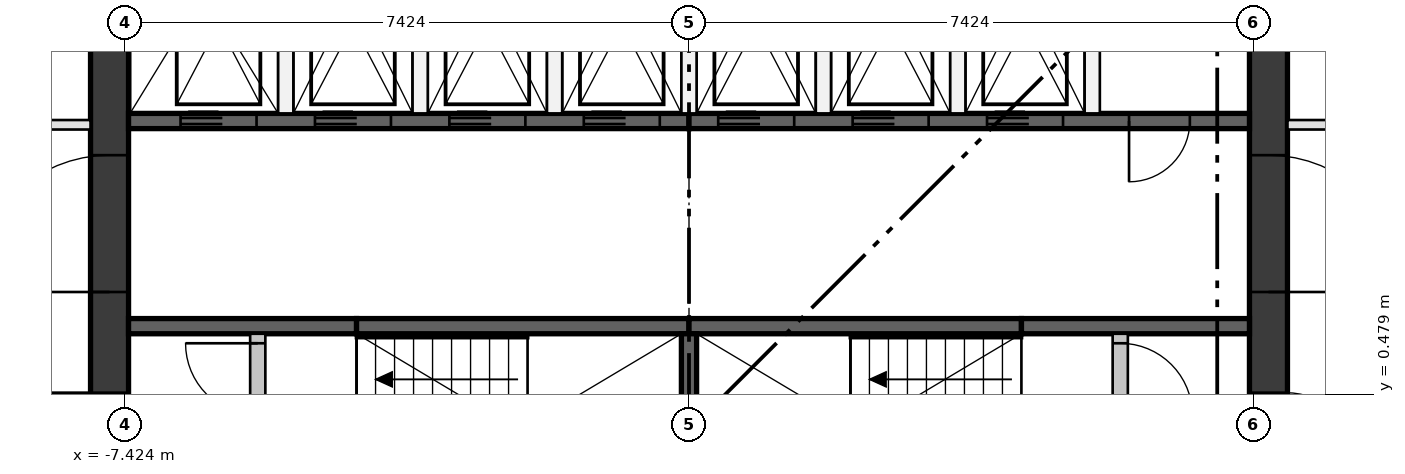
"""IFC4 building model, lengths in metres.
Left out: names, types, materials, properties, quantities, classifications, styles, units other than length and angle.
Written with IfcOpenShell. Run it as: python <this file> out.ifc"""

import sys

from ifc_helpers import new_model, si_unit, direction, frame, frame_2d, origin, place, context, subcontext, project, spatial, rectangle, extrude, element, fill, save


model = new_model("IFC4")
c1 = context("Model", 3, precision=1e-05, world=origin(), true_north=direction((0.0, 1.0)))
c2 = subcontext(c1, "Body", "Model", "MODEL_VIEW")
j1 = project(units=[si_unit("LENGTHUNIT", "METRE"), si_unit("PLANEANGLEUNIT", "RADIAN")], contexts=[c1])
p1 = place(None, origin())
s1 = spatial("IfcSite", under=j1, at=p1, CompositionType="ELEMENT")
p2 = place(p1, origin())
s2 = spatial("IfcBuilding", under=s1, at=p2, CompositionType="ELEMENT")
p3 = place(p2, frame((0.0, 0.0, 180.95)))
s3 = spatial("IfcBuildingStorey", under=s2, at=p3, CompositionType="ELEMENT", Elevation=180.95)
p4 = place(p3, frame((-7.624, -7.374, 0.0), z_axis=(0.0, 0.0, 1.0), x_axis=(0.0, 1.0, 0.0)))
e1 = element("IfcWall", 1, at=p4, inside=s3, PredefinedType="SHEAR", context=c2, shape_type="SweptSolid", body=[
    extrude(rectangle(XDim=14.748, YDim=0.5, at=frame_2d((7.374, 0.0))), origin(), (0.0, 0.0, 1.0), 3.35),
])
p5 = place(p4, frame((6.874, 0.0, 0.0)))
e2 = element("IfcOpeningElement", 2, at=p5, cuts=e1, PredefinedType="OPENING", context=c2, shape_type="SweptSolid", body=[
    extrude(rectangle(XDim=1.0, YDim=2.1, at=frame_2d((0.5, 1.05))), frame((0.0, 0.26, 0.0), z_axis=(0.0, -1.0, 0.0), x_axis=(1.0, 0.0, 0.0)), (0.0, 0.0, 1.0), 0.52),
])
p6 = place(p4, frame((3.75, 0.0, 0.0)))
e3 = element("IfcOpeningElement", 3, at=p6, cuts=e1, PredefinedType="OPENING", context=c2, shape_type="SweptSolid", body=[
    extrude(rectangle(XDim=1.8, YDim=2.1, at=frame_2d((0.9, 1.05))), frame((0.0, 0.26, 0.0), z_axis=(0.0, -1.0, 0.0), x_axis=(1.0, 0.0, 0.0)), (0.0, 0.0, 1.0), 0.52),
])
p7 = place(p4, frame((9.198, 0.0, 0.0)))
e4 = element("IfcOpeningElement", 4, at=p7, cuts=e1, PredefinedType="OPENING", context=c2, shape_type="SweptSolid", body=[
    extrude(rectangle(XDim=1.8, YDim=2.1, at=frame_2d((0.9, 1.05))), frame((0.0, 0.26, 0.0), z_axis=(0.0, -1.0, 0.0), x_axis=(1.0, 0.0, 0.0)), (0.0, 0.0, 1.0), 0.52),
])
p8 = place(p3, frame((7.624, -7.374, 0.0), z_axis=(0.0, 0.0, 1.0), x_axis=(0.0, 1.0, 0.0)))
e5 = element("IfcWall", 5, at=p8, inside=s3, PredefinedType="SHEAR", context=c2, shape_type="SweptSolid", body=[
    extrude(rectangle(XDim=14.748, YDim=0.5, at=frame_2d((7.374, 0.0))), origin(), (0.0, 0.0, 1.0), 3.35),
])
p9 = place(p8, frame((6.874, 0.0, 0.0)))
e6 = element("IfcOpeningElement", 6, at=p9, cuts=e5, PredefinedType="OPENING", context=c2, shape_type="SweptSolid", body=[
    extrude(rectangle(XDim=1.0, YDim=2.1, at=frame_2d((0.5, 1.05))), frame((0.0, 0.26, 0.0), z_axis=(0.0, -1.0, 0.0), x_axis=(1.0, 0.0, 0.0)), (0.0, 0.0, 1.0), 0.52),
])
p10 = place(p8, frame((3.75, 0.0, 0.0)))
e7 = element("IfcOpeningElement", 7, at=p10, cuts=e5, PredefinedType="OPENING", context=c2, shape_type="SweptSolid", body=[
    extrude(rectangle(XDim=1.8, YDim=2.1, at=frame_2d((0.9, 1.05))), frame((0.0, 0.26, 0.0), z_axis=(0.0, -1.0, 0.0), x_axis=(1.0, 0.0, 0.0)), (0.0, 0.0, 1.0), 0.52),
])
p11 = place(p8, frame((9.198, 0.0, 0.0)))
e8 = element("IfcOpeningElement", 8, at=p11, cuts=e5, PredefinedType="OPENING", context=c2, shape_type="SweptSolid", body=[
    extrude(rectangle(XDim=1.8, YDim=2.1, at=frame_2d((0.9, 1.05))), frame((0.0, 0.26, 0.0), z_axis=(0.0, -1.0, 0.0), x_axis=(1.0, 0.0, 0.0)), (0.0, 0.0, 1.0), 0.52),
])
p12 = place(p3, frame((-7.374, 4.074, 0.0), z_axis=(0.0, 0.0, 1.0), x_axis=(1.0, 0.0, 0.0)))
e9 = element("IfcWall", 9, at=p12, inside=s3, PredefinedType="SHEAR", context=c2, shape_type="SweptSolid", body=[
    extrude(rectangle(XDim=7.374, YDim=0.2, at=frame_2d((3.687, 0.0))), origin(), (0.0, 0.0, 1.0), 3.0),
])
p13 = place(p12, frame((0.684, 0.0, 0.0)))
e10 = element("IfcOpeningElement", 10, at=p13, cuts=e9, PredefinedType="OPENING", context=c2, shape_type="SweptSolid", body=[
    extrude(rectangle(XDim=1.0, YDim=2.1, at=frame_2d((0.5, 1.05))), frame((0.0, 0.11, 0.0), z_axis=(0.0, -1.0, 0.0), x_axis=(1.0, 0.0, 0.0)), (0.0, 0.0, 1.0), 0.22),
])
p14 = place(p12, frame((2.453, 0.0, 0.0)))
e11 = element("IfcOpeningElement", 11, at=p14, cuts=e9, PredefinedType="OPENING", context=c2, shape_type="SweptSolid", body=[
    extrude(rectangle(XDim=1.0, YDim=2.1, at=frame_2d((0.5, 1.05))), frame((0.0, 0.11, 0.0), z_axis=(0.0, -1.0, 0.0), x_axis=(1.0, 0.0, 0.0)), (0.0, 0.0, 1.0), 0.22),
])
p15 = place(p12, frame((4.221, 0.0, 0.0)))
e12 = element("IfcOpeningElement", 12, at=p15, cuts=e9, PredefinedType="OPENING", context=c2, shape_type="SweptSolid", body=[
    extrude(rectangle(XDim=1.0, YDim=2.1, at=frame_2d((0.5, 1.05))), frame((0.0, 0.11, 0.0), z_axis=(0.0, -1.0, 0.0), x_axis=(1.0, 0.0, 0.0)), (0.0, 0.0, 1.0), 0.22),
])
p16 = place(p12, frame((5.99, 0.0, 0.0)))
e13 = element("IfcOpeningElement", 13, at=p16, cuts=e9, PredefinedType="OPENING", context=c2, shape_type="SweptSolid", body=[
    extrude(rectangle(XDim=1.0, YDim=2.1, at=frame_2d((0.5, 1.05))), frame((0.0, 0.11, 0.0), z_axis=(0.0, -1.0, 0.0), x_axis=(1.0, 0.0, 0.0)), (0.0, 0.0, 1.0), 0.22),
])
p17 = place(p3, frame((0.0, 4.074, 0.0), z_axis=(0.0, 0.0, 1.0), x_axis=(1.0, 0.0, 0.0)))
e14 = element("IfcWall", 14, at=p17, inside=s3, PredefinedType="SHEAR", context=c2, shape_type="SweptSolid", body=[
    extrude(rectangle(XDim=7.374, YDim=0.2, at=frame_2d((3.687, 0.0))), origin(), (0.0, 0.0, 1.0), 3.0),
])
p18 = place(p17, frame((0.384, 0.0, 0.0)))
e15 = element("IfcOpeningElement", 15, at=p18, cuts=e14, PredefinedType="OPENING", context=c2, shape_type="SweptSolid", body=[
    extrude(rectangle(XDim=1.0, YDim=2.1, at=frame_2d((0.5, 1.05))), frame((0.0, 0.11, 0.0), z_axis=(0.0, -1.0, 0.0), x_axis=(1.0, 0.0, 0.0)), (0.0, 0.0, 1.0), 0.22),
])
p19 = place(p17, frame((2.153, 0.0, 0.0)))
e16 = element("IfcOpeningElement", 16, at=p19, cuts=e14, PredefinedType="OPENING", context=c2, shape_type="SweptSolid", body=[
    extrude(rectangle(XDim=1.0, YDim=2.1, at=frame_2d((0.5, 1.05))), frame((0.0, 0.11, 0.0), z_axis=(0.0, -1.0, 0.0), x_axis=(1.0, 0.0, 0.0)), (0.0, 0.0, 1.0), 0.22),
])
p20 = place(p17, frame((3.921, 0.0, 0.0)))
e17 = element("IfcOpeningElement", 17, at=p20, cuts=e14, PredefinedType="OPENING", context=c2, shape_type="SweptSolid", body=[
    extrude(rectangle(XDim=1.0, YDim=2.1, at=frame_2d((0.5, 1.05))), frame((0.0, 0.11, 0.0), z_axis=(0.0, -1.0, 0.0), x_axis=(1.0, 0.0, 0.0)), (0.0, 0.0, 1.0), 0.22),
])
p21 = place(p17, frame((5.79, 0.0, 0.0)))
e18 = element("IfcOpeningElement", 18, at=p21, cuts=e14, PredefinedType="OPENING", context=c2, shape_type="SweptSolid", body=[
    extrude(rectangle(XDim=0.8, YDim=2.1, at=frame_2d((0.4, 1.05))), frame((0.0, 0.11, 0.0), z_axis=(0.0, -1.0, 0.0), x_axis=(1.0, 0.0, 0.0)), (0.0, 0.0, 1.0), 0.22),
])
p22 = place(p3, frame((-7.374, 1.375, 0.0), z_axis=(0.0, 0.0, 1.0), x_axis=(1.0, 0.0, 0.0)))
e19 = element("IfcWall", 19, at=p22, inside=s3, PredefinedType="SHEAR", context=c2, shape_type="SweptSolid", body=[
    extrude(rectangle(XDim=3.0, YDim=0.2, at=frame_2d((1.5, 0.0))), origin(), (0.0, 0.0, 1.0), 3.0),
])
for number, where, z_axis, x_axis in (
    (20, (-4.374, 1.375, 0.0), (0.0, 0.0, 1.0), (1.0, 0.0, 0.0)),
    (21, (0.0, 1.375, 0.0), (0.0, 0.0, 1.0), (1.0, 0.0, 0.0)),
):
    element("IfcWall", number, at=place(p3, frame(where, z_axis=z_axis, x_axis=x_axis)), inside=s3, PredefinedType="SHEAR", context=c2, shape_type="SweptSolid", body=[
        extrude(rectangle(XDim=4.374, YDim=0.2, at=frame_2d((2.187, 0.0))), origin(), (0.0, 0.0, 1.0), 3.0),
    ])
p23 = place(p3, frame((4.374, 1.375, 0.0), z_axis=(0.0, 0.0, 1.0), x_axis=(1.0, 0.0, 0.0)))
e22 = element("IfcWall", 22, at=p23, inside=s3, PredefinedType="SHEAR", context=c2, shape_type="SweptSolid", body=[
    extrude(rectangle(XDim=3.0, YDim=0.2, at=frame_2d((1.5, 0.0))), origin(), (0.0, 0.0, 1.0), 3.0),
])
p24 = place(p3, frame((0.0, -1.275, 0.0), z_axis=(0.0, 0.0, 1.0), x_axis=(0.0, 1.0, 0.0)))
e23 = element("IfcWall", 23, at=p24, inside=s3, PredefinedType="SHEAR", context=c2, shape_type="SweptSolid", body=[
    extrude(rectangle(XDim=2.55, YDim=0.2, at=frame_2d((1.275, 0.0))), origin(), (0.0, 0.0, 1.0), 3.0),
])
for number, where, z_axis, x_axis in (
    (24, (-5.305, 4.174, 0.0), (0.0, 0.0, 1.0), (0.0, 1.0, 0.0)),
    (25, (-3.537, 4.174, 0.0), (0.0, 0.0, 1.0), (0.0, 1.0, 0.0)),
    (26, (-1.769, 4.174, 0.0), (0.0, 0.0, 1.0), (0.0, 1.0, 0.0)),
    (27, (0.0, 4.174, 0.0), (0.0, 0.0, 1.0), (0.0, 1.0, 0.0)),
    (28, (1.769, 4.174, 0.0), (0.0, 0.0, 1.0), (0.0, 1.0, 0.0)),
    (29, (3.537, 4.174, 0.0), (0.0, 0.0, 1.0), (0.0, 1.0, 0.0)),
    (30, (5.305, 4.174, 0.0), (0.0, 0.0, 1.0), (0.0, 1.0, 0.0)),
):
    element("IfcWall", number, at=place(p3, frame(where, z_axis=z_axis, x_axis=x_axis)), inside=s3, PredefinedType="PARTITIONING", context=c2, shape_type="SweptSolid", body=[
        extrude(rectangle(XDim=3.2, YDim=0.2, at=frame_2d((1.6, 0.0))), origin(), (0.0, 0.0, 1.0), 3.0),
    ])
p25 = place(p3, frame((-5.674, -1.275, 0.0), z_axis=(0.0, 0.0, 1.0), x_axis=(0.0, 1.0, 0.0)))
e31 = element("IfcWall", 31, at=p25, inside=s3, PredefinedType="PARTITIONING", context=c2, shape_type="SweptSolid", body=[
    extrude(rectangle(XDim=2.55, YDim=0.2, at=frame_2d((1.275, 0.0))), origin(), (0.0, 0.0, 1.0), 3.0),
])
p26 = place(p25, frame((0.125, 0.0, 0.0)))
e32 = element("IfcOpeningElement", 32, at=p26, cuts=e31, PredefinedType="OPENING", context=c2, shape_type="SweptSolid", body=[
    extrude(rectangle(XDim=0.95, YDim=2.1, at=frame_2d((0.475, 1.05))), frame((0.0, 0.11, 0.0), z_axis=(0.0, -1.0, 0.0), x_axis=(1.0, 0.0, 0.0)), (0.0, 0.0, 1.0), 0.22),
])
p27 = place(p25, frame((1.475, 0.0, 0.0)))
e33 = element("IfcOpeningElement", 33, at=p27, cuts=e31, PredefinedType="OPENING", context=c2, shape_type="SweptSolid", body=[
    extrude(rectangle(XDim=0.95, YDim=2.1, at=frame_2d((0.475, 1.05))), frame((0.0, 0.11, 0.0), z_axis=(0.0, -1.0, 0.0), x_axis=(1.0, 0.0, 0.0)), (0.0, 0.0, 1.0), 0.22),
])
p28 = place(p3, frame((5.674, -1.275, 0.0), z_axis=(0.0, 0.0, 1.0), x_axis=(0.0, 1.0, 0.0)))
e34 = element("IfcWall", 34, at=p28, inside=s3, PredefinedType="PARTITIONING", context=c2, shape_type="SweptSolid", body=[
    extrude(rectangle(XDim=2.55, YDim=0.2, at=frame_2d((1.275, 0.0))), origin(), (0.0, 0.0, 1.0), 3.0),
])
p29 = place(p28, frame((0.125, 0.0, 0.0)))
e35 = element("IfcOpeningElement", 35, at=p29, cuts=e34, PredefinedType="OPENING", context=c2, shape_type="SweptSolid", body=[
    extrude(rectangle(XDim=0.95, YDim=2.1, at=frame_2d((0.475, 1.05))), frame((0.0, 0.11, 0.0), z_axis=(0.0, -1.0, 0.0), x_axis=(1.0, 0.0, 0.0)), (0.0, 0.0, 1.0), 0.22),
])
p30 = place(p28, frame((1.475, 0.0, 0.0)))
e36 = element("IfcOpeningElement", 36, at=p30, cuts=e34, PredefinedType="OPENING", context=c2, shape_type="SweptSolid", body=[
    extrude(rectangle(XDim=0.95, YDim=2.1, at=frame_2d((0.475, 1.05))), frame((0.0, 0.11, 0.0), z_axis=(0.0, -1.0, 0.0), x_axis=(1.0, 0.0, 0.0)), (0.0, 0.0, 1.0), 0.22),
])
p31 = place(p3, frame((7.874, 4.024, 0.0), z_axis=(0.0, 0.0, 1.0), x_axis=(1.0, 0.0, 0.0)))
e37 = element("IfcWall", 37, at=p31, inside=s3, PredefinedType="PARTITIONING", context=c2, shape_type="SweptSolid", body=[
    extrude(rectangle(XDim=5.921, YDim=0.125, at=frame_2d((2.96, 0.0))), origin(), (0.0, 0.0, 1.0), 3.0),
])
p32 = place(p31, frame((2.5, 0.0, 0.0)))
e38 = element("IfcOpeningElement", 38, at=p32, cuts=e37, PredefinedType="OPENING", context=c2, shape_type="SweptSolid", body=[
    extrude(rectangle(XDim=1.0, YDim=2.1, at=frame_2d((0.5, 1.05))), frame((0.0, 0.073, 0.0), z_axis=(0.0, -1.0, 0.0), x_axis=(1.0, 0.0, 0.0)), (0.0, 0.0, 1.0), 0.145),
])
p33 = place(p3, frame((-13.373, 4.024, 0.0), z_axis=(0.0, 0.0, 1.0), x_axis=(1.0, 0.0, 0.0)))
e39 = element("IfcWall", 39, at=p33, inside=s3, PredefinedType="PARTITIONING", context=c2, shape_type="SweptSolid", body=[
    extrude(rectangle(XDim=5.499, YDim=0.125, at=frame_2d((2.75, 0.0))), origin(), (0.0, 0.0, 1.0), 3.0),
])
p34 = place(p33, frame((2.2, 0.0, 0.0)))
e40 = element("IfcOpeningElement", 40, at=p34, cuts=e39, PredefinedType="OPENING", context=c2, shape_type="SweptSolid", body=[
    extrude(rectangle(XDim=1.0, YDim=2.1, at=frame_2d((0.5, 1.05))), frame((0.0, 0.073, 0.0), z_axis=(0.0, -1.0, 0.0), x_axis=(1.0, 0.0, 0.0)), (0.0, 0.0, 1.0), 0.145),
])
p35 = place(p13, frame((1.0, 0.0, 0.0), z_axis=(0.0, 0.0, 1.0), x_axis=(-1.0, 0.0, 0.0)))
e41 = element("IfcDoor", 41, at=p35, inside=s3, OperationType="DOUBLE_DOOR_SLIDING", PredefinedType="DOOR", context=c2, shape_type="SweptSolid", body=[
    extrude(rectangle(XDim=1.0, YDim=2.1, at=frame_2d((0.5, 1.05))), frame((0.0, 0.025, 0.0), z_axis=(0.0, -1.0, 0.0), x_axis=(1.0, 0.0, 0.0)), (0.0, 0.0, 1.0), 0.05),
])
fill(e10, e41)
p36 = place(p14, frame((1.0, 0.0, 0.0), z_axis=(0.0, 0.0, 1.0), x_axis=(-1.0, 0.0, 0.0)))
e42 = element("IfcDoor", 42, at=p36, inside=s3, OperationType="DOUBLE_DOOR_SLIDING", PredefinedType="DOOR", context=c2, shape_type="SweptSolid", body=[
    extrude(rectangle(XDim=1.0, YDim=2.1, at=frame_2d((0.5, 1.05))), frame((0.0, 0.025, 0.0), z_axis=(0.0, -1.0, 0.0), x_axis=(1.0, 0.0, 0.0)), (0.0, 0.0, 1.0), 0.05),
])
fill(e11, e42)
p37 = place(p15, frame((1.0, 0.0, 0.0), z_axis=(0.0, 0.0, 1.0), x_axis=(-1.0, 0.0, 0.0)))
e43 = element("IfcDoor", 43, at=p37, inside=s3, OperationType="DOUBLE_DOOR_SLIDING", PredefinedType="DOOR", context=c2, shape_type="SweptSolid", body=[
    extrude(rectangle(XDim=1.0, YDim=2.1, at=frame_2d((0.5, 1.05))), frame((0.0, 0.025, 0.0), z_axis=(0.0, -1.0, 0.0), x_axis=(1.0, 0.0, 0.0)), (0.0, 0.0, 1.0), 0.05),
])
fill(e12, e43)
p38 = place(p16, frame((1.0, 0.0, 0.0), z_axis=(0.0, 0.0, 1.0), x_axis=(-1.0, 0.0, 0.0)))
e44 = element("IfcDoor", 44, at=p38, inside=s3, OperationType="DOUBLE_DOOR_SLIDING", PredefinedType="DOOR", context=c2, shape_type="SweptSolid", body=[
    extrude(rectangle(XDim=1.0, YDim=2.1, at=frame_2d((0.5, 1.05))), frame((0.0, 0.025, 0.0), z_axis=(0.0, -1.0, 0.0), x_axis=(1.0, 0.0, 0.0)), (0.0, 0.0, 1.0), 0.05),
])
fill(e13, e44)
p39 = place(p18, frame((1.0, 0.0, 0.0), z_axis=(0.0, 0.0, 1.0), x_axis=(-1.0, 0.0, 0.0)))
e45 = element("IfcDoor", 45, at=p39, inside=s3, OperationType="DOUBLE_DOOR_SLIDING", PredefinedType="DOOR", context=c2, shape_type="SweptSolid", body=[
    extrude(rectangle(XDim=1.0, YDim=2.1, at=frame_2d((0.5, 1.05))), frame((0.0, 0.025, 0.0), z_axis=(0.0, -1.0, 0.0), x_axis=(1.0, 0.0, 0.0)), (0.0, 0.0, 1.0), 0.05),
])
fill(e15, e45)
p40 = place(p19, frame((1.0, 0.0, 0.0), z_axis=(0.0, 0.0, 1.0), x_axis=(-1.0, 0.0, 0.0)))
e46 = element("IfcDoor", 46, at=p40, inside=s3, OperationType="DOUBLE_DOOR_SLIDING", PredefinedType="DOOR", context=c2, shape_type="SweptSolid", body=[
    extrude(rectangle(XDim=1.0, YDim=2.1, at=frame_2d((0.5, 1.05))), frame((0.0, 0.025, 0.0), z_axis=(0.0, -1.0, 0.0), x_axis=(1.0, 0.0, 0.0)), (0.0, 0.0, 1.0), 0.05),
])
fill(e16, e46)
p41 = place(p20, frame((1.0, 0.0, 0.0), z_axis=(0.0, 0.0, 1.0), x_axis=(-1.0, 0.0, 0.0)))
e47 = element("IfcDoor", 47, at=p41, inside=s3, OperationType="DOUBLE_DOOR_SLIDING", PredefinedType="DOOR", context=c2, shape_type="SweptSolid", body=[
    extrude(rectangle(XDim=1.0, YDim=2.1, at=frame_2d((0.5, 1.05))), frame((0.0, 0.025, 0.0), z_axis=(0.0, -1.0, 0.0), x_axis=(1.0, 0.0, 0.0)), (0.0, 0.0, 1.0), 0.05),
])
fill(e17, e47)
p42 = place(p27, origin())
e48 = element("IfcDoor", 48, at=p42, inside=s3, OperationType="SINGLE_SWING_RIGHT", PredefinedType="DOOR", context=c2, shape_type="SweptSolid", body=[
    extrude(rectangle(XDim=0.95, YDim=2.1, at=frame_2d((0.475, 1.05))), frame((0.0, 0.025, 0.0), z_axis=(0.0, -1.0, 0.0), x_axis=(1.0, 0.0, 0.0)), (0.0, 0.0, 1.0), 0.05),
])
fill(e33, e48)
p43 = place(p30, frame((0.95, 0.0, 0.0), z_axis=(0.0, 0.0, 1.0), x_axis=(-1.0, 0.0, 0.0)))
e49 = element("IfcDoor", 49, at=p43, inside=s3, OperationType="SINGLE_SWING_LEFT", PredefinedType="DOOR", context=c2, shape_type="SweptSolid", body=[
    extrude(rectangle(XDim=0.95, YDim=2.1, at=frame_2d((0.475, 1.05))), frame((0.0, 0.025, 0.0), z_axis=(0.0, -1.0, 0.0), x_axis=(1.0, 0.0, 0.0)), (0.0, 0.0, 1.0), 0.05),
])
fill(e36, e49)
p44 = place(p21, frame((0.8, 0.0, 0.0), z_axis=(0.0, 0.0, 1.0), x_axis=(-1.0, 0.0, 0.0)))
e50 = element("IfcDoor", 50, at=p44, inside=s3, OperationType="SINGLE_SWING_LEFT", PredefinedType="DOOR", context=c2, shape_type="SweptSolid", body=[
    extrude(rectangle(XDim=0.8, YDim=2.1, at=frame_2d((0.4, 1.05))), frame((0.0, 0.025, 0.0), z_axis=(0.0, -1.0, 0.0), x_axis=(1.0, 0.0, 0.0)), (0.0, 0.0, 1.0), 0.05),
])
fill(e18, e50)
p45 = place(p5, origin())
e51 = element("IfcDoor", 51, at=p45, inside=s3, OperationType="SINGLE_SWING_RIGHT", PredefinedType="DOOR", context=c2, shape_type="SweptSolid", body=[
    extrude(rectangle(XDim=1.0, YDim=2.1, at=frame_2d((0.5, 1.05))), frame((0.0, 0.25, 0.0), z_axis=(0.0, -1.0, 0.0), x_axis=(1.0, 0.0, 0.0)), (0.0, 0.0, 1.0), 0.05),
])
fill(e2, e51)
p46 = place(p7, origin())
e52 = element("IfcDoor", 52, at=p46, inside=s3, OperationType="DOUBLE_DOOR_SINGLE_SWING", PredefinedType="DOOR", context=c2, shape_type="SweptSolid", body=[
    extrude(rectangle(XDim=1.8, YDim=2.1, at=frame_2d((0.9, 1.05))), frame((0.0, 0.025, 0.0), z_axis=(0.0, -1.0, 0.0), x_axis=(1.0, 0.0, 0.0)), (0.0, 0.0, 1.0), 0.05),
])
fill(e4, e52)
p47 = place(p9, frame((1.0, 0.0, 0.0), z_axis=(0.0, 0.0, 1.0), x_axis=(-1.0, 0.0, 0.0)))
e53 = element("IfcDoor", 53, at=p47, inside=s3, OperationType="SINGLE_SWING_LEFT", PredefinedType="DOOR", context=c2, shape_type="SweptSolid", body=[
    extrude(rectangle(XDim=1.0, YDim=2.1, at=frame_2d((0.5, 1.05))), frame((0.0, 0.25, 0.0), z_axis=(0.0, -1.0, 0.0), x_axis=(1.0, 0.0, 0.0)), (0.0, 0.0, 1.0), 0.05),
])
fill(e6, e53)
p48 = place(p11, frame((1.8, 0.0, 0.0), z_axis=(0.0, 0.0, 1.0), x_axis=(-1.0, 0.0, 0.0)))
e54 = element("IfcDoor", 54, at=p48, inside=s3, OperationType="DOUBLE_DOOR_SINGLE_SWING", PredefinedType="DOOR", context=c2, shape_type="SweptSolid", body=[
    extrude(rectangle(XDim=1.8, YDim=2.1, at=frame_2d((0.9, 1.05))), frame((0.0, 0.025, 0.0), z_axis=(0.0, -1.0, 0.0), x_axis=(1.0, 0.0, 0.0)), (0.0, 0.0, 1.0), 0.05),
])
fill(e8, e54)
save(model, sys.argv[1])
